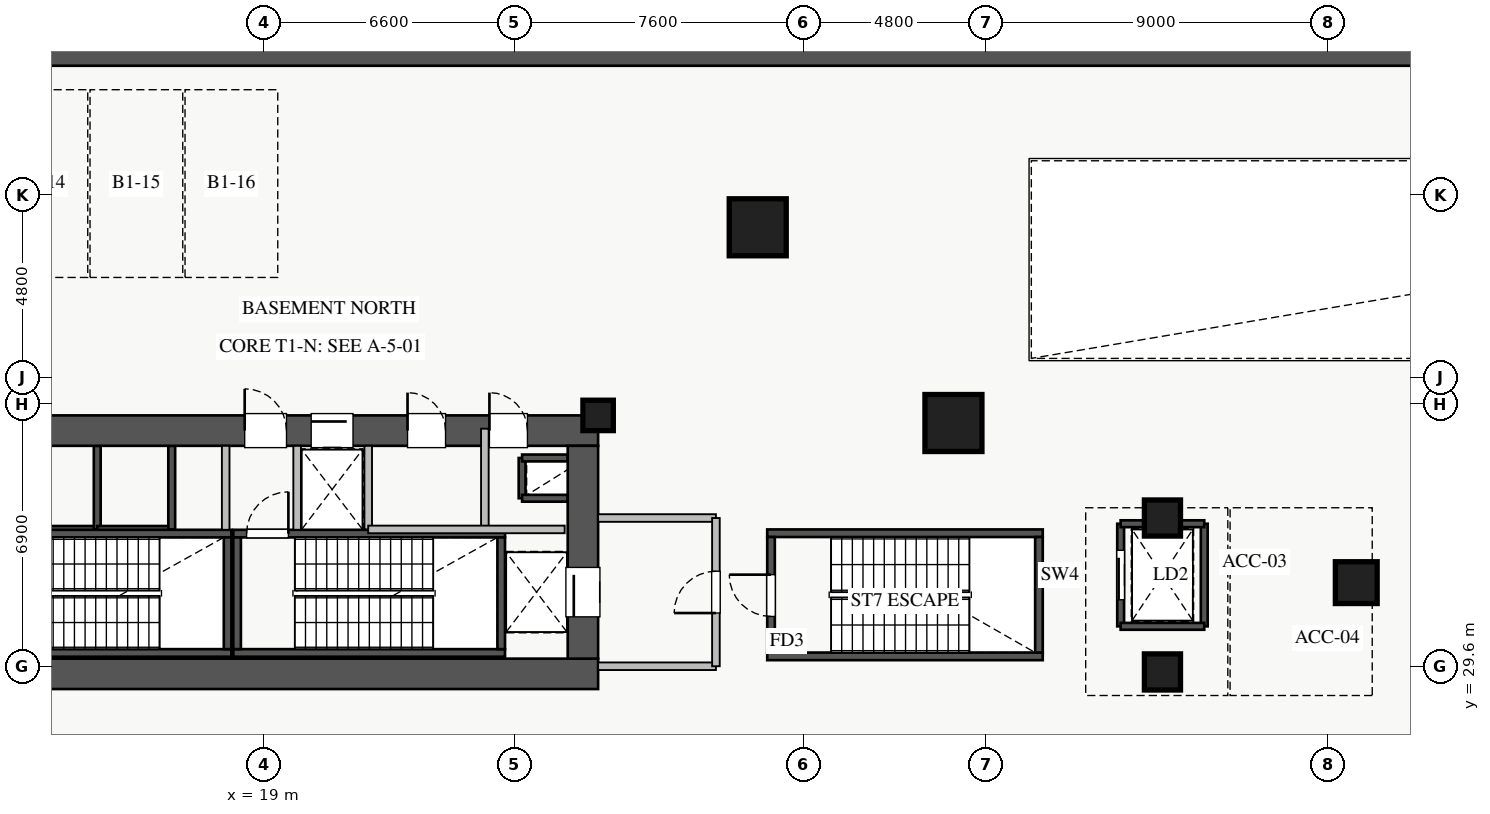
"""IFC4 building model, lengths in metres.
Left out: names, types, materials, properties, quantities, classifications, styles, units other than length and angle.
Written with IfcOpenShell. Run it as: python <this file> out.ifc"""

import sys

from ifc_helpers import new_model, si_unit, direction, frame, frame_2d, origin, origin_2d, place, context, subcontext, project, spatial, rectangle, extrude, source, transform, mapped, element, fill, save


model = new_model("IFC4")
c1 = context("Model", 3, precision=1e-05, world=origin(), true_north=direction((0.0, 1.0)))
c2 = subcontext(c1, "Body", "Model", "MODEL_VIEW")
j1 = project(units=[si_unit("LENGTHUNIT", "METRE"), si_unit("PLANEANGLEUNIT", "RADIAN")], contexts=[c1])
p1 = place(None, origin())
s1 = spatial("IfcSite", under=j1, at=p1, CompositionType="ELEMENT")
p2 = place(p1, origin())
s2 = spatial("IfcBuilding", under=s1, at=p2, CompositionType="ELEMENT")
p3 = place(p2, frame((0.0, 0.0, -4.8)))
s3 = spatial("IfcBuildingStorey", under=s2, at=p3, CompositionType="ELEMENT", Elevation=-4.8)
p4 = place(p3, frame((12.68, 33.2, 0.0), z_axis=(0.0, 0.0, 1.0), x_axis=(1.0, 0.0, 0.0)))
e1 = element("IfcWall", 1, at=p4, inside=s3, PredefinedType="SHEAR", context=c2, shape_type="SweptSolid", body=[
    extrude(rectangle(XDim=1.94, YDim=0.18, at=frame_2d((0.97, 0.0))), origin(), (0.0, 0.0, 1.0), 4.58),
])
p5 = place(p3, frame((14.62, 33.2, 0.0), z_axis=(0.0, 0.0, 1.0), x_axis=(0.0, 1.0, 0.0)))
e2 = element("IfcWall", 2, at=p5, inside=s3, PredefinedType="SHEAR", context=c2, shape_type="SweptSolid", body=[
    extrude(rectangle(XDim=2.2, YDim=0.18, at=frame_2d((1.1, 0.0))), origin(), (0.0, 0.0, 1.0), 4.58),
])
p6 = place(p3, frame((25.8, 34.02, 0.0), z_axis=(0.0, 0.0, 1.0), x_axis=(0.0, 1.0, 0.0)))
e3 = element("IfcWall", 3, at=p6, inside=s3, PredefinedType="SHEAR", context=c2, shape_type="SweptSolid", body=[
    extrude(rectangle(XDim=1.06, YDim=0.18, at=frame_2d((0.53, 0.0))), origin(), (0.0, 0.0, 1.0), 4.58),
])
for number, where, z_axis, x_axis in (
    (4, (25.8, 35.08, 0.0), (0.0, 0.0, 1.0), (1.0, 0.0, 0.0)),
    (5, (25.8, 34.02, 0.0), (0.0, 0.0, 1.0), (1.0, 0.0, 0.0)),
):
    element("IfcWall", number, at=place(p3, frame(where, z_axis=z_axis, x_axis=x_axis)), inside=s3, PredefinedType="SHEAR", context=c2, shape_type="SweptSolid", body=[
        extrude(rectangle(XDim=1.2, YDim=0.18, at=frame_2d((0.6, 0.0))), origin(), (0.0, 0.0, 1.0), 4.58),
    ])
p7 = place(p3, frame((14.62, 33.2, 0.0), z_axis=(0.0, 0.0, 1.0), x_axis=(1.0, 0.0, 0.0)))
e6 = element("IfcWall", 6, at=p7, inside=s3, PredefinedType="SHEAR", context=c2, shape_type="SweptSolid", body=[
    extrude(rectangle(XDim=1.96, YDim=0.18, at=frame_2d((0.98, 0.0))), origin(), (0.0, 0.0, 1.0), 4.58),
])
p8 = place(p3, frame((16.58, 33.2, 0.0), z_axis=(0.0, 0.0, 1.0), x_axis=(0.0, 1.0, 0.0)))
e7 = element("IfcWall", 7, at=p8, inside=s3, PredefinedType="SHEAR", context=c2, shape_type="SweptSolid", body=[
    extrude(rectangle(XDim=2.2, YDim=0.18, at=frame_2d((1.1, 0.0))), origin(), (0.0, 0.0, 1.0), 4.58),
])
p9 = place(p3, frame((19.88, 33.2, 0.0), z_axis=(0.0, 0.0, 1.0), x_axis=(1.0, 0.0, 0.0)))
e8 = element("IfcWall", 8, at=p9, inside=s3, PredefinedType="SHEAR", context=c2, shape_type="SweptSolid", body=[
    extrude(rectangle(XDim=1.87, YDim=0.18, at=frame_2d((0.935, 0.0))), origin(), (0.0, 0.0, 1.0), 4.58),
])
p10 = place(p3, frame((41.55, 30.65, 0.0), z_axis=(0.0, 0.0, 1.0), x_axis=(0.0, 1.0, 0.0)))
e9 = element("IfcWall", 9, at=p10, inside=s3, PredefinedType="SHEAR", context=c2, shape_type="SweptSolid", body=[
    extrude(rectangle(XDim=2.7, YDim=0.18, at=frame_2d((1.35, 0.0))), origin(), (0.0, 0.0, 1.0), 4.58),
])
p11 = place(p10, frame((0.7, 0.0, 0.0)))
e10 = element("IfcOpeningElement", 10, at=p11, cuts=e9, PredefinedType="OPENING", context=c2, shape_type="SweptSolid", body=[
    extrude(rectangle(XDim=1.3, YDim=2.05, at=frame_2d((0.65, 1.025))), frame((0.0, 0.1, 0.0), z_axis=(0.0, -1.0, 0.0), x_axis=(1.0, 0.0, 0.0)), (0.0, 0.0, 1.0), 0.2),
])
p12 = place(p3, frame((43.75, 30.65, 0.0), z_axis=(0.0, 0.0, 1.0), x_axis=(0.0, 1.0, 0.0)))
e11 = element("IfcWall", 11, at=p12, inside=s3, PredefinedType="SHEAR", context=c2, shape_type="SweptSolid", body=[
    extrude(rectangle(XDim=2.7, YDim=0.18, at=frame_2d((1.35, 0.0))), origin(), (0.0, 0.0, 1.0), 4.58),
])
for number, where, z_axis, x_axis in (
    (12, (41.55, 30.65, 0.0), (0.0, 0.0, 1.0), (1.0, 0.0, 0.0)),
    (13, (41.55, 33.35, 0.0), (0.0, 0.0, 1.0), (1.0, 0.0, 0.0)),
):
    element("IfcWall", number, at=place(p3, frame(where, z_axis=z_axis, x_axis=x_axis)), inside=s3, PredefinedType="SHEAR", context=c2, shape_type="SweptSolid", body=[
        extrude(rectangle(XDim=2.2, YDim=0.18, at=frame_2d((1.1, 0.0))), origin(), (0.0, 0.0, 1.0), 4.58),
    ])
p13 = place(p3, frame((11.0, 29.95, 0.0), z_axis=(0.0, 0.0, 1.0), x_axis=(1.0, 0.0, 0.0)))
e14 = element("IfcWall", 14, at=p13, inside=s3, PredefinedType="SHEAR", context=c2, shape_type="SweptSolid", body=[
    extrude(rectangle(XDim=7.15, YDim=0.2, at=frame_2d((3.575, 0.0))), origin(), (0.0, 0.0, 1.0), 4.8),
])
p14 = place(p3, frame((11.0, 33.09, 0.0), z_axis=(0.0, 0.0, 1.0), x_axis=(1.0, 0.0, 0.0)))
e15 = element("IfcWall", 15, at=p14, inside=s3, PredefinedType="SHEAR", context=c2, shape_type="SweptSolid", body=[
    extrude(rectangle(XDim=7.15, YDim=0.2, at=frame_2d((3.575, 0.0))), origin(), (0.0, 0.0, 1.0), 4.8),
])
p15 = place(p14, frame((0.35, 0.0, 0.0)))
e16 = element("IfcOpeningElement", 16, at=p15, cuts=e15, PredefinedType="OPENING", context=c2, shape_type="SweptSolid", body=[
    extrude(rectangle(XDim=1.1, YDim=2.05, at=frame_2d((0.55, 1.025))), frame((0.0, 0.11, 0.0), z_axis=(0.0, -1.0, 0.0), x_axis=(1.0, 0.0, 0.0)), (0.0, 0.0, 1.0), 0.22),
])
p16 = place(p3, frame((18.05, 30.05, 0.0), z_axis=(0.0, 0.0, 1.0), x_axis=(0.0, 1.0, 0.0)))
e17 = element("IfcWall", 17, at=p16, inside=s3, PredefinedType="SHEAR", context=c2, shape_type="SweptSolid", body=[
    extrude(rectangle(XDim=2.94, YDim=0.2, at=frame_2d((1.47, 0.0))), origin(), (0.0, 0.0, 1.0), 4.8),
])
p17 = place(p3, frame((18.2, 29.95, 0.0), z_axis=(0.0, 0.0, 1.0), x_axis=(1.0, 0.0, 0.0)))
e18 = element("IfcWall", 18, at=p17, inside=s3, PredefinedType="SHEAR", context=c2, shape_type="SweptSolid", body=[
    extrude(rectangle(XDim=7.15, YDim=0.2, at=frame_2d((3.575, 0.0))), origin(), (0.0, 0.0, 1.0), 4.8),
])
p18 = place(p3, frame((18.2, 33.09, 0.0), z_axis=(0.0, 0.0, 1.0), x_axis=(1.0, 0.0, 0.0)))
e19 = element("IfcWall", 19, at=p18, inside=s3, PredefinedType="SHEAR", context=c2, shape_type="SweptSolid", body=[
    extrude(rectangle(XDim=7.15, YDim=0.2, at=frame_2d((3.575, 0.0))), origin(), (0.0, 0.0, 1.0), 4.8),
])
p19 = place(p18, frame((0.35, 0.0, 0.0)))
e20 = element("IfcOpeningElement", 20, at=p19, cuts=e19, PredefinedType="OPENING", context=c2, shape_type="SweptSolid", body=[
    extrude(rectangle(XDim=1.1, YDim=2.05, at=frame_2d((0.55, 1.025))), frame((0.0, 0.11, 0.0), z_axis=(0.0, -1.0, 0.0), x_axis=(1.0, 0.0, 0.0)), (0.0, 0.0, 1.0), 0.22),
])
for number, where, z_axis, x_axis in (
    (21, (18.3, 30.05, 0.0), (0.0, 0.0, 1.0), (0.0, 1.0, 0.0)),
    (22, (25.25, 30.05, 0.0), (0.0, 0.0, 1.0), (0.0, 1.0, 0.0)),
):
    element("IfcWall", number, at=place(p3, frame(where, z_axis=z_axis, x_axis=x_axis)), inside=s3, PredefinedType="SHEAR", context=c2, shape_type="SweptSolid", body=[
        extrude(rectangle(XDim=2.94, YDim=0.2, at=frame_2d((1.47, 0.0))), origin(), (0.0, 0.0, 1.0), 4.8),
    ])
for number, where, z_axis, x_axis in (
    (23, (32.25, 29.86, 0.0), (0.0, 0.0, 1.0), (1.0, 0.0, 0.0)),
    (24, (32.25, 33.1, 0.0), (0.0, 0.0, 1.0), (1.0, 0.0, 0.0)),
):
    element("IfcWall", number, at=place(p3, frame(where, z_axis=z_axis, x_axis=x_axis)), inside=s3, PredefinedType="SHEAR", context=c2, shape_type="SweptSolid", body=[
        extrude(rectangle(XDim=7.25, YDim=0.2, at=frame_2d((3.625, 0.0))), origin(), (0.0, 0.0, 1.0), 4.8),
    ])
p20 = place(p3, frame((32.35, 29.96, 0.0), z_axis=(0.0, 0.0, 1.0), x_axis=(0.0, 1.0, 0.0)))
e25 = element("IfcWall", 25, at=p20, inside=s3, PredefinedType="SHEAR", context=c2, shape_type="SweptSolid", body=[
    extrude(rectangle(XDim=3.04, YDim=0.2, at=frame_2d((1.52, 0.0))), origin(), (0.0, 0.0, 1.0), 4.8),
])
p21 = place(p20, frame((0.95, 0.0, 0.0)))
e26 = element("IfcOpeningElement", 26, at=p21, cuts=e25, PredefinedType="OPENING", context=c2, shape_type="SweptSolid", body=[
    extrude(rectangle(XDim=1.1, YDim=2.05, at=frame_2d((0.55, 1.025))), frame((0.0, 0.11, 0.0), z_axis=(0.0, -1.0, 0.0), x_axis=(1.0, 0.0, 0.0)), (0.0, 0.0, 1.0), 0.22),
])
p22 = place(p3, frame((39.4, 29.96, 0.0), z_axis=(0.0, 0.0, 1.0), x_axis=(0.0, 1.0, 0.0)))
e27 = element("IfcWall", 27, at=p22, inside=s3, PredefinedType="SHEAR", context=c2, shape_type="SweptSolid", body=[
    extrude(rectangle(XDim=3.04, YDim=0.2, at=frame_2d((1.52, 0.0))), origin(), (0.0, 0.0, 1.0), 4.8),
])
p23 = place(p3, frame((0.0, 45.7, 0.0), z_axis=(0.0, 0.0, 1.0), x_axis=(1.0, 0.0, 0.0)))
e28 = element("IfcWall", 28, at=p23, inside=s3, PredefinedType="SOLIDWALL", context=c2, shape_type="SweptSolid", body=[
    extrude(rectangle(XDim=74.0, YDim=0.6, at=frame_2d((37.0, 0.0))), origin(), (0.0, 0.0, 1.0), 4.8),
])
p24 = place(p3, frame((10.2, 29.4, 0.0), z_axis=(0.0, 0.0, 1.0), x_axis=(1.0, 0.0, 0.0)))
e29 = element("IfcWall", 29, at=p24, inside=s3, PredefinedType="SHEAR", context=c2, shape_type="SweptSolid", body=[
    extrude(rectangle(XDim=17.6, YDim=0.8, at=frame_2d((8.8, 0.0))), origin(), (0.0, 0.0, 1.0), 4.8),
])
p25 = place(p3, frame((10.2, 35.8, 0.0), z_axis=(0.0, 0.0, 1.0), x_axis=(1.0, 0.0, 0.0)))
e30 = element("IfcWall", 30, at=p25, inside=s3, PredefinedType="SHEAR", context=c2, shape_type="SweptSolid", body=[
    extrude(rectangle(XDim=17.6, YDim=0.8, at=frame_2d((8.8, 0.0))), origin(), (0.0, 0.0, 1.0), 4.8),
])
p26 = place(p25, frame((1.15, 0.0, 0.0)))
e31 = element("IfcOpeningElement", 31, at=p26, cuts=e30, PredefinedType="OPENING", context=c2, shape_type="SweptSolid", body=[
    extrude(rectangle(XDim=1.1, YDim=2.05, at=frame_2d((0.55, 1.025))), frame((0.0, 0.41, 0.0), z_axis=(0.0, -1.0, 0.0), x_axis=(1.0, 0.0, 0.0)), (0.0, 0.0, 1.0), 0.82),
])
p27 = place(p25, frame((8.3, 0.0, 0.0)))
e32 = element("IfcOpeningElement", 32, at=p27, cuts=e30, PredefinedType="OPENING", context=c2, shape_type="SweptSolid", body=[
    extrude(rectangle(XDim=1.1, YDim=2.05, at=frame_2d((0.55, 1.025))), frame((0.0, 0.41, 0.0), z_axis=(0.0, -1.0, 0.0), x_axis=(1.0, 0.0, 0.0)), (0.0, 0.0, 1.0), 0.82),
])
p28 = place(p25, frame((10.05, 0.0, 0.0)))
e33 = element("IfcOpeningElement", 33, at=p28, cuts=e30, PredefinedType="OPENING", context=c2, shape_type="SweptSolid", body=[
    extrude(rectangle(XDim=1.1, YDim=2.05, at=frame_2d((0.55, 1.025))), frame((0.0, 0.41, 0.0), z_axis=(0.0, -1.0, 0.0), x_axis=(1.0, 0.0, 0.0)), (0.0, 0.0, 1.0), 0.82),
])
p29 = place(p25, frame((14.74, 0.0, 0.0)))
e34 = element("IfcOpeningElement", 34, at=p29, cuts=e30, PredefinedType="OPENING", context=c2, shape_type="SweptSolid", body=[
    extrude(rectangle(XDim=1.0, YDim=2.05, at=frame_2d((0.5, 1.025))), frame((0.0, 0.41, 0.0), z_axis=(0.0, -1.0, 0.0), x_axis=(1.0, 0.0, 0.0)), (0.0, 0.0, 1.0), 0.82),
])
p30 = place(p25, frame((12.585, 0.0, 0.0)))
e35 = element("IfcOpeningElement", 35, at=p30, cuts=e30, PredefinedType="OPENING", context=c2, shape_type="SweptSolid", body=[
    extrude(rectangle(XDim=1.0, YDim=2.05, at=frame_2d((0.5, 1.025))), frame((0.0, 0.41, 0.0), z_axis=(0.0, -1.0, 0.0), x_axis=(1.0, 0.0, 0.0)), (0.0, 0.0, 1.0), 0.82),
])
p31 = place(p3, frame((27.4, 29.8, 0.0), z_axis=(0.0, 0.0, 1.0), x_axis=(0.0, 1.0, 0.0)))
e36 = element("IfcWall", 36, at=p31, inside=s3, PredefinedType="SHEAR", context=c2, shape_type="SweptSolid", body=[
    extrude(rectangle(XDim=5.6, YDim=0.8, at=frame_2d((2.8, 0.0))), origin(), (0.0, 0.0, 1.0), 4.8),
])
p32 = place(p31, frame((1.1, 0.0, 0.0)))
e37 = element("IfcOpeningElement", 37, at=p32, cuts=e36, PredefinedType="OPENING", context=c2, shape_type="SweptSolid", body=[
    extrude(rectangle(XDim=1.3, YDim=2.05, at=frame_2d((0.65, 1.025))), frame((0.0, 0.41, 0.0), z_axis=(0.0, -1.0, 0.0), x_axis=(1.0, 0.0, 0.0)), (0.0, 0.0, 1.0), 0.82),
])
m1 = source(origin(), c2, "Body", "SweptSolid", [
    extrude(rectangle(XDim=1.5, YDim=1.5, at=origin_2d()), origin(), (0.0, 0.0, 1.0), 4.8),
])
for number, where, z_axis, x_axis in (
    (38, (37.15, 36.0, 0.0), (0.0, 0.0, 1.0), (1.0, 0.0, 0.0)),
    (39, (32.0, 41.15, 0.0), (0.0, 0.0, 1.0), (1.0, 0.0, 0.0)),
):
    element("IfcColumn", number, at=place(p3, frame(where, z_axis=z_axis, x_axis=x_axis)), inside=s3, PredefinedType="COLUMN", context=c2, shape_type="MappedRepresentation", body=[
        mapped(m1, transform((0.0, 0.0, 0.0), x_axis=(1.0, 0.0, 0.0), y_axis=(0.0, 1.0, 0.0), z_axis=(0.0, 0.0, 1.0), scale=1.0)),
    ])
m2 = source(origin(), c2, "Body", "SweptSolid", [
    extrude(rectangle(XDim=1.1, YDim=1.1, at=origin_2d()), origin(), (0.0, 0.0, 1.0), 4.8),
])
p33 = place(p3, frame((47.75, 31.8, 0.0), z_axis=(0.0, 0.0, 1.0), x_axis=(1.0, 0.0, 0.0)))
e40 = element("IfcColumn", 40, at=p33, inside=s3, PredefinedType="COLUMN", context=c2, shape_type="MappedRepresentation", body=[
    mapped(m2, transform((0.0, 0.0, 0.0), x_axis=(1.0, 0.0, 0.0), y_axis=(0.0, 1.0, 0.0), z_axis=(0.0, 0.0, 1.0), scale=1.0)),
])
m3 = source(origin(), c2, "Body", "SweptSolid", [
    extrude(rectangle(XDim=0.95, YDim=0.95, at=origin_2d()), origin(), (0.0, 0.0, 1.0), 4.8),
])
for number, where, z_axis, x_axis in (
    (41, (42.65, 29.45, 0.0), (0.0, 0.0, 1.0), (1.0, 0.0, 0.0)),
    (42, (42.65, 33.5, 0.0), (0.0, 0.0, 1.0), (1.0, 0.0, 0.0)),
):
    element("IfcColumn", number, at=place(p3, frame(where, z_axis=z_axis, x_axis=x_axis)), inside=s3, PredefinedType="COLUMN", context=c2, shape_type="MappedRepresentation", body=[
        mapped(m3, transform((0.0, 0.0, 0.0), x_axis=(1.0, 0.0, 0.0), y_axis=(0.0, 1.0, 0.0), z_axis=(0.0, 0.0, 1.0), scale=1.0)),
    ])
m4 = source(origin(), c2, "Body", "SweptSolid", [
    extrude(rectangle(XDim=0.8, YDim=0.8, at=origin_2d()), origin(), (0.0, 0.0, 1.0), 4.8),
])
p34 = place(p3, frame((27.8, 36.2, 0.0), z_axis=(0.0, 0.0, 1.0), x_axis=(1.0, 0.0, 0.0)))
e43 = element("IfcColumn", 43, at=p34, inside=s3, PredefinedType="PILASTER", context=c2, shape_type="MappedRepresentation", body=[
    mapped(m4, transform((0.0, 0.0, 0.0), x_axis=(1.0, 0.0, 0.0), y_axis=(0.0, 1.0, 0.0), z_axis=(0.0, 0.0, 1.0), scale=1.0)),
])
p35 = place(p3, frame((27.8, 29.6, 0.0), z_axis=(0.0, 0.0, 1.0), x_axis=(1.0, 0.0, 0.0)))
e44 = element("IfcWall", 44, at=p35, inside=s3, PredefinedType="PARTITIONING", context=c2, shape_type="SweptSolid", body=[
    extrude(rectangle(XDim=3.1, YDim=0.2, at=frame_2d((1.55, 0.0))), origin(), (0.0, 0.0, 1.0), 3.875),
])
p36 = place(p3, frame((27.8, 33.5, 0.0), z_axis=(0.0, 0.0, 1.0), x_axis=(1.0, 0.0, 0.0)))
e45 = element("IfcWall", 45, at=p36, inside=s3, PredefinedType="PARTITIONING", context=c2, shape_type="SweptSolid", body=[
    extrude(rectangle(XDim=3.1, YDim=0.2, at=frame_2d((1.55, 0.0))), origin(), (0.0, 0.0, 1.0), 3.575),
])
p37 = place(p3, frame((30.9, 29.6, 0.0), z_axis=(0.0, 0.0, 1.0), x_axis=(0.0, 1.0, 0.0)))
e46 = element("IfcWall", 46, at=p37, inside=s3, PredefinedType="PARTITIONING", context=c2, shape_type="SweptSolid", body=[
    extrude(rectangle(XDim=3.9, YDim=0.2, at=frame_2d((1.95, 0.0))), origin(), (0.0, 0.0, 1.0), 4.58),
])
p38 = place(p37, frame((1.4, 0.0, 0.0)))
e47 = element("IfcOpeningElement", 47, at=p38, cuts=e46, PredefinedType="OPENING", context=c2, shape_type="SweptSolid", body=[
    extrude(rectangle(XDim=1.1, YDim=2.05, at=frame_2d((0.55, 1.025))), frame((0.0, 0.11, 0.0), z_axis=(0.0, -1.0, 0.0), x_axis=(1.0, 0.0, 0.0)), (0.0, 0.0, 1.0), 0.22),
])
for number, where, z_axis, x_axis in (
    (48, (18.0, 33.19, 0.0), (0.0, 0.0, 1.0), (0.0, 1.0, 0.0)),
    (49, (19.88, 33.19, 0.0), (0.0, 0.0, 1.0), (0.0, 1.0, 0.0)),
):
    element("IfcWall", number, at=place(p3, frame(where, z_axis=z_axis, x_axis=x_axis)), inside=s3, PredefinedType="PARTITIONING", context=c2, shape_type="SweptSolid", body=[
        extrude(rectangle(XDim=2.21, YDim=0.2, at=frame_2d((1.105, 0.0))), origin(), (0.0, 0.0, 1.0), 4.58),
    ])
p39 = place(p3, frame((24.82, 33.2, 0.0), z_axis=(0.0, 0.0, 1.0), x_axis=(0.0, 1.0, 0.0)))
e50 = element("IfcWall", 50, at=p39, inside=s3, PredefinedType="PARTITIONING", context=c2, shape_type="SweptSolid", body=[
    extrude(rectangle(XDim=2.65, YDim=0.2, at=frame_2d((1.325, 0.0))), origin(), (0.0, 0.0, 1.0), 4.58),
])
p40 = place(p3, frame((21.75, 33.2, 0.0), z_axis=(0.0, 0.0, 1.0), x_axis=(0.0, 1.0, 0.0)))
e51 = element("IfcWall", 51, at=p40, inside=s3, PredefinedType="PARTITIONING", context=c2, shape_type="SweptSolid", body=[
    extrude(rectangle(XDim=2.2, YDim=0.2, at=frame_2d((1.1, 0.0))), origin(), (0.0, 0.0, 1.0), 4.58),
])
p41 = place(p3, frame((21.75, 33.2, 0.0), z_axis=(0.0, 0.0, 1.0), x_axis=(1.0, 0.0, 0.0)))
e52 = element("IfcWall", 52, at=p41, inside=s3, PredefinedType="PARTITIONING", context=c2, shape_type="SweptSolid", body=[
    extrude(rectangle(XDim=5.17, YDim=0.2, at=frame_2d((2.585, 0.0))), origin(), (0.0, 0.0, 1.0), 4.58),
])
m5 = source(origin(), c2, "Body", "SweptSolid", [
    extrude(rectangle(XDim=1.3, YDim=2.05, at=frame_2d((0.65, 1.025))), frame((0.0, 0.025, 0.0), z_axis=(0.0, -1.0, 0.0), x_axis=(1.0, 0.0, 0.0)), (0.0, 0.0, 1.0), 0.05),
])
p42 = place(p32, origin())
e53 = element("IfcDoor", 53, at=p42, inside=s3, OperationType="SLIDING_TO_LEFT", PredefinedType="DOOR", context=c2, shape_type="MappedRepresentation", body=[
    mapped(m5, transform((0.0, 0.0, 0.0), x_axis=(1.0, 0.0, 0.0), y_axis=(0.0, 1.0, 0.0), z_axis=(0.0, 0.0, 1.0), scale=1.0)),
])
fill(e37, e53)
m6 = source(origin(), c2, "Body", "SweptSolid", [
    extrude(rectangle(XDim=1.1, YDim=2.05, at=frame_2d((0.55, 1.025))), frame((0.0, 0.025, 0.0), z_axis=(0.0, -1.0, 0.0), x_axis=(1.0, 0.0, 0.0)), (0.0, 0.0, 1.0), 0.05),
])
p43 = place(p27, origin())
e54 = element("IfcDoor", 54, at=p43, inside=s3, OperationType="SINGLE_SWING_LEFT", PredefinedType="DOOR", context=c2, shape_type="MappedRepresentation", body=[
    mapped(m6, transform((0.0, 0.0, 0.0), x_axis=(1.0, 0.0, 0.0), y_axis=(0.0, 1.0, 0.0), z_axis=(0.0, 0.0, 1.0), scale=1.0)),
])
fill(e32, e54)
p44 = place(p19, origin())
e55 = element("IfcDoor", 55, at=p44, inside=s3, OperationType="SINGLE_SWING_RIGHT", PredefinedType="DOOR", context=c2, shape_type="MappedRepresentation", body=[
    mapped(m6, transform((0.0, 0.0, 0.0), x_axis=(1.0, 0.0, 0.0), y_axis=(0.0, 1.0, 0.0), z_axis=(0.0, 0.0, 1.0), scale=1.0)),
])
fill(e20, e55)
p45 = place(p28, origin())
e56 = element("IfcDoor", 56, at=p45, inside=s3, OperationType="SLIDING_TO_LEFT", PredefinedType="DOOR", context=c2, shape_type="MappedRepresentation", body=[
    mapped(m6, transform((0.0, 0.0, 0.0), x_axis=(1.0, 0.0, 0.0), y_axis=(0.0, 1.0, 0.0), z_axis=(0.0, 0.0, 1.0), scale=1.0)),
])
fill(e33, e56)
m7 = source(origin(), c2, "Body", "SweptSolid", [
    extrude(rectangle(XDim=1.0, YDim=2.05, at=frame_2d((0.5, 1.025))), frame((0.0, 0.025, 0.0), z_axis=(0.0, -1.0, 0.0), x_axis=(1.0, 0.0, 0.0)), (0.0, 0.0, 1.0), 0.05),
])
p46 = place(p29, origin())
e57 = element("IfcDoor", 57, at=p46, inside=s3, OperationType="SINGLE_SWING_LEFT", PredefinedType="DOOR", context=c2, shape_type="MappedRepresentation", body=[
    mapped(m7, transform((0.0, 0.0, 0.0), x_axis=(1.0, 0.0, 0.0), y_axis=(0.0, 1.0, 0.0), z_axis=(0.0, 0.0, 1.0), scale=1.0)),
])
fill(e34, e57)
p47 = place(p30, origin())
e58 = element("IfcDoor", 58, at=p47, inside=s3, OperationType="SINGLE_SWING_LEFT", PredefinedType="DOOR", context=c2, shape_type="MappedRepresentation", body=[
    mapped(m7, transform((0.0, 0.0, 0.0), x_axis=(1.0, 0.0, 0.0), y_axis=(0.0, 1.0, 0.0), z_axis=(0.0, 0.0, 1.0), scale=1.0)),
])
fill(e35, e58)
p48 = place(p21, origin())
e59 = element("IfcDoor", 59, at=p48, inside=s3, OperationType="SINGLE_SWING_RIGHT", PredefinedType="DOOR", context=c2, shape_type="MappedRepresentation", body=[
    mapped(m6, transform((0.0, 0.0, 0.0), x_axis=(1.0, 0.0, 0.0), y_axis=(0.0, 1.0, 0.0), z_axis=(0.0, 0.0, 1.0), scale=1.0)),
])
fill(e26, e59)
p49 = place(p11, origin())
e60 = element("IfcDoor", 60, at=p49, inside=s3, OperationType="SLIDING_TO_LEFT", PredefinedType="DOOR", context=c2, shape_type="MappedRepresentation", body=[
    mapped(m5, transform((0.0, 0.0, 0.0), x_axis=(1.0, 0.0, 0.0), y_axis=(0.0, 1.0, 0.0), z_axis=(0.0, 0.0, 1.0), scale=1.0)),
])
fill(e10, e60)
p50 = place(p38, origin())
e61 = element("IfcDoor", 61, at=p50, inside=s3, OperationType="SINGLE_SWING_LEFT", PredefinedType="DOOR", context=c2, shape_type="MappedRepresentation", body=[
    mapped(m6, transform((0.0, 0.0, 0.0), x_axis=(1.0, 0.0, 0.0), y_axis=(0.0, 1.0, 0.0), z_axis=(0.0, 0.0, 1.0), scale=1.0)),
])
fill(e47, e61)
save(model, sys.argv[1])
